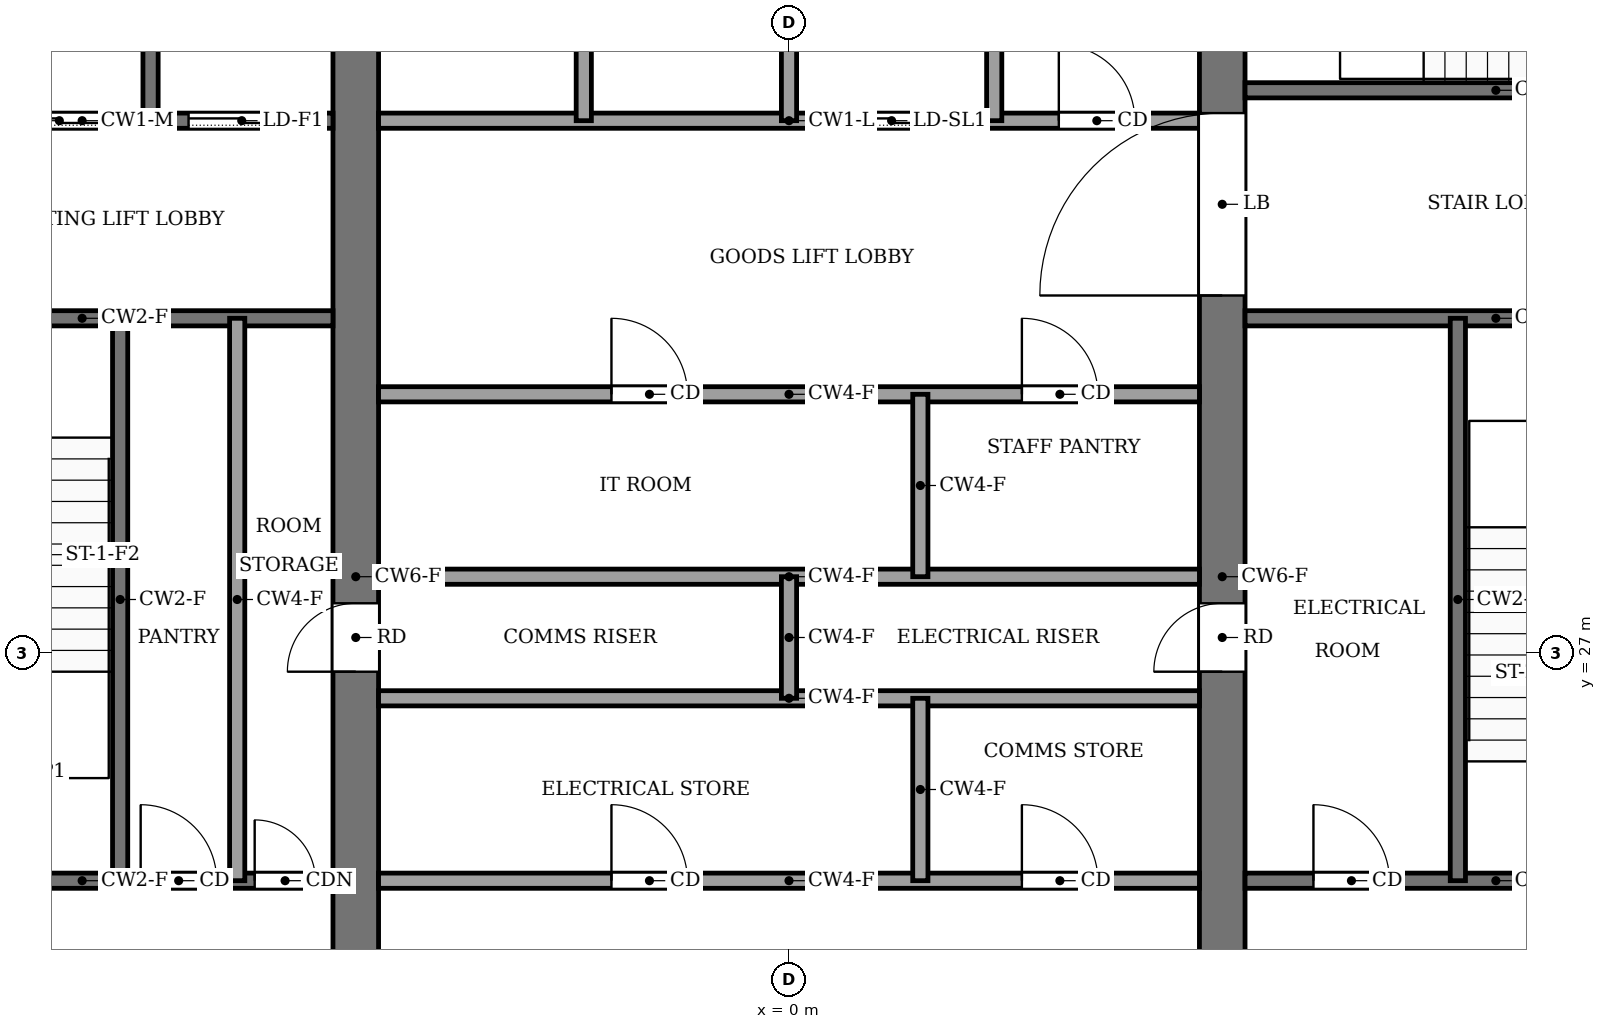
"""IFC4 building model, lengths in metres.
Left out: names, types, materials, properties, quantities, classifications, styles, units other than length and angle.
Written with IfcOpenShell. Run it as: python <this file> out.ifc"""

import sys

from ifc_helpers import new_model, si_unit, direction, frame, frame_2d, origin, place, context, subcontext, project, spatial, rectangle, extrude, element, fill, save


model = new_model("IFC4")
c1 = context("Model", 3, precision=1e-05, world=origin(), true_north=direction((0.0, 1.0)))
c2 = subcontext(c1, "Body", "Model", "MODEL_VIEW")
j1 = project(units=[si_unit("LENGTHUNIT", "METRE"), si_unit("PLANEANGLEUNIT", "RADIAN")], contexts=[c1])
p1 = place(None, origin())
s1 = spatial("IfcSite", under=j1, at=p1, CompositionType="ELEMENT")
p2 = place(p1, origin())
s2 = spatial("IfcBuilding", under=s1, at=p2, CompositionType="ELEMENT")
p3 = place(p2, frame((0.0, 0.0, 330.0)))
s3 = spatial("IfcBuildingStorey", under=s2, at=p3, CompositionType="ELEMENT", Elevation=330.0)
p4 = place(p3, frame((-5.7, 18.4, -0.13), z_axis=(0.0, 0.0, 1.0), x_axis=(0.0, 1.0, 0.0)))
e1 = element("IfcWall", 1, at=p4, inside=s3, PredefinedType="SHEAR", context=c2, shape_type="SweptSolid", body=[
    extrude(rectangle(XDim=19.2, YDim=0.6, at=frame_2d((9.6, 0.0))), origin(), (0.0, 0.0, 1.0), 3.95),
])
p5 = place(p4, frame((8.35, 0.0, 0.13)))
e2 = element("IfcOpeningElement", 2, at=p5, cuts=e1, PredefinedType="OPENING", context=c2, shape_type="SweptSolid", body=[
    extrude(rectangle(XDim=0.9, YDim=2.1, at=frame_2d((0.45, 1.05))), frame((0.0, 0.31, 0.0), z_axis=(0.0, -1.0, 0.0), x_axis=(1.0, 0.0, 0.0)), (0.0, 0.0, 1.0), 0.62),
])
p6 = place(p3, frame((5.7, 18.4, -0.13), z_axis=(0.0, 0.0, 1.0), x_axis=(0.0, 1.0, 0.0)))
e3 = element("IfcWall", 3, at=p6, inside=s3, PredefinedType="SHEAR", context=c2, shape_type="SweptSolid", body=[
    extrude(rectangle(XDim=19.2, YDim=0.6, at=frame_2d((9.6, 0.0))), origin(), (0.0, 0.0, 1.0), 3.95),
])
p7 = place(p6, frame((8.35, 0.0, 0.13)))
e4 = element("IfcOpeningElement", 4, at=p7, cuts=e3, PredefinedType="OPENING", context=c2, shape_type="SweptSolid", body=[
    extrude(rectangle(XDim=0.9, YDim=2.1, at=frame_2d((0.45, 1.05))), frame((0.0, 0.31, 0.0), z_axis=(0.0, -1.0, 0.0), x_axis=(1.0, 0.0, 0.0)), (0.0, 0.0, 1.0), 0.62),
])
p8 = place(p6, frame((13.3, 0.0, 0.13)))
e5 = element("IfcOpeningElement", 5, at=p8, cuts=e3, PredefinedType="OPENING", context=c2, shape_type="SweptSolid", body=[
    extrude(rectangle(XDim=2.4, YDim=2.4, at=frame_2d((1.2, 1.2))), frame((0.0, 0.31, 0.0), z_axis=(0.0, -1.0, 0.0), x_axis=(1.0, 0.0, 0.0)), (0.0, 0.0, 1.0), 0.62),
])
p9 = place(p3, frame((-12.6, 24.0, 0.0), z_axis=(0.0, 0.0, 1.0), x_axis=(1.0, 0.0, 0.0)))
e6 = element("IfcWall", 6, at=p9, inside=s3, PredefinedType="PARTITIONING", context=c2, shape_type="SweptSolid", body=[
    extrude(rectangle(XDim=6.6, YDim=0.2, at=frame_2d((3.3, 0.0))), origin(), (0.0, 0.0, 1.0), 3.82),
])
p10 = place(p9, frame((4.07, 0.0, 0.0)))
e7 = element("IfcOpeningElement", 7, at=p10, cuts=e6, PredefinedType="OPENING", context=c2, shape_type="SweptSolid", body=[
    extrude(rectangle(XDim=1.0, YDim=2.1, at=frame_2d((0.5, 1.05))), frame((0.0, 0.11, 0.0), z_axis=(0.0, -1.0, 0.0), x_axis=(1.0, 0.0, 0.0)), (0.0, 0.0, 1.0), 0.22),
])
p11 = place(p9, frame((5.57, 0.0, 0.0)))
e8 = element("IfcOpeningElement", 8, at=p11, cuts=e6, PredefinedType="OPENING", context=c2, shape_type="SweptSolid", body=[
    extrude(rectangle(XDim=0.8, YDim=2.1, at=frame_2d((0.4, 1.05))), frame((0.0, 0.11, 0.0), z_axis=(0.0, -1.0, 0.0), x_axis=(1.0, 0.0, 0.0)), (0.0, 0.0, 1.0), 0.22),
])
p12 = place(p3, frame((-5.4, 24.0, 0.0), z_axis=(0.0, 0.0, 1.0), x_axis=(1.0, 0.0, 0.0)))
e9 = element("IfcWall", 9, at=p12, inside=s3, PredefinedType="PARTITIONING", context=c2, shape_type="SweptSolid", body=[
    extrude(rectangle(XDim=10.8, YDim=0.2, at=frame_2d((5.4, 0.0))), origin(), (0.0, 0.0, 1.0), 3.82),
])
p13 = place(p12, frame((3.064, 0.0, 0.0)))
e10 = element("IfcOpeningElement", 10, at=p13, cuts=e9, PredefinedType="OPENING", context=c2, shape_type="SweptSolid", body=[
    extrude(rectangle(XDim=1.0, YDim=2.1, at=frame_2d((0.5, 1.05))), frame((0.0, 0.11, 0.0), z_axis=(0.0, -1.0, 0.0), x_axis=(1.0, 0.0, 0.0)), (0.0, 0.0, 1.0), 0.22),
])
p14 = place(p12, frame((8.464, 0.0, 0.0)))
e11 = element("IfcOpeningElement", 11, at=p14, cuts=e9, PredefinedType="OPENING", context=c2, shape_type="SweptSolid", body=[
    extrude(rectangle(XDim=1.0, YDim=2.1, at=frame_2d((0.5, 1.05))), frame((0.0, 0.11, 0.0), z_axis=(0.0, -1.0, 0.0), x_axis=(1.0, 0.0, 0.0)), (0.0, 0.0, 1.0), 0.22),
])
p15 = place(p3, frame((6.0, 24.0, 0.0), z_axis=(0.0, 0.0, 1.0), x_axis=(1.0, 0.0, 0.0)))
e12 = element("IfcWall", 12, at=p15, inside=s3, PredefinedType="PARTITIONING", context=c2, shape_type="SweptSolid", body=[
    extrude(rectangle(XDim=6.6, YDim=0.2, at=frame_2d((3.3, 0.0))), origin(), (0.0, 0.0, 1.0), 3.82),
])
p16 = place(p15, frame((0.9, 0.0, 0.0)))
e13 = element("IfcOpeningElement", 13, at=p16, cuts=e12, PredefinedType="OPENING", context=c2, shape_type="SweptSolid", body=[
    extrude(rectangle(XDim=1.0, YDim=2.1, at=frame_2d((0.5, 1.05))), frame((0.0, 0.11, 0.0), z_axis=(0.0, -1.0, 0.0), x_axis=(1.0, 0.0, 0.0)), (0.0, 0.0, 1.0), 0.22),
])
p17 = place(p15, frame((4.4, 0.0, 0.0)))
e14 = element("IfcOpeningElement", 14, at=p17, cuts=e12, PredefinedType="OPENING", context=c2, shape_type="SweptSolid", body=[
    extrude(rectangle(XDim=1.2, YDim=2.2, at=frame_2d((0.6, 1.1))), frame((0.0, 0.11, 0.0), z_axis=(0.0, -1.0, 0.0), x_axis=(1.0, 0.0, 0.0)), (0.0, 0.0, 1.0), 0.22),
])
for number, where, z_axis, x_axis in (
    (15, (-5.4, 26.4, 0.0), (0.0, 0.0, 1.0), (1.0, 0.0, 0.0)),
    (16, (-5.4, 28.0, 0.0), (0.0, 0.0, 1.0), (1.0, 0.0, 0.0)),
):
    element("IfcWall", number, at=place(p3, frame(where, z_axis=z_axis, x_axis=x_axis)), inside=s3, PredefinedType="PARTITIONING", context=c2, shape_type="SweptSolid", body=[
        extrude(rectangle(XDim=10.8, YDim=0.2, at=frame_2d((5.4, 0.0))), origin(), (0.0, 0.0, 1.0), 3.82),
    ])
p18 = place(p3, frame((-5.4, 30.4, 0.0), z_axis=(0.0, 0.0, 1.0), x_axis=(1.0, 0.0, 0.0)))
e17 = element("IfcWall", 17, at=p18, inside=s3, PredefinedType="PARTITIONING", context=c2, shape_type="SweptSolid", body=[
    extrude(rectangle(XDim=10.8, YDim=0.2, at=frame_2d((5.4, 0.0))), origin(), (0.0, 0.0, 1.0), 3.82),
])
p19 = place(p18, frame((3.064, 0.0, 0.0)))
e18 = element("IfcOpeningElement", 18, at=p19, cuts=e17, PredefinedType="OPENING", context=c2, shape_type="SweptSolid", body=[
    extrude(rectangle(XDim=1.0, YDim=2.1, at=frame_2d((0.5, 1.05))), frame((0.0, 0.11, 0.0), z_axis=(0.0, -1.0, 0.0), x_axis=(1.0, 0.0, 0.0)), (0.0, 0.0, 1.0), 0.22),
])
p20 = place(p18, frame((8.464, 0.0, 0.0)))
e19 = element("IfcOpeningElement", 19, at=p20, cuts=e17, PredefinedType="OPENING", context=c2, shape_type="SweptSolid", body=[
    extrude(rectangle(XDim=1.0, YDim=2.1, at=frame_2d((0.5, 1.05))), frame((0.0, 0.11, 0.0), z_axis=(0.0, -1.0, 0.0), x_axis=(1.0, 0.0, 0.0)), (0.0, 0.0, 1.0), 0.22),
])
p21 = place(p3, frame((-12.6, 31.4, 0.0), z_axis=(0.0, 0.0, 1.0), x_axis=(1.0, 0.0, 0.0)))
e20 = element("IfcWall", 20, at=p21, inside=s3, PredefinedType="PARTITIONING", context=c2, shape_type="SweptSolid", body=[
    extrude(rectangle(XDim=6.6, YDim=0.2, at=frame_2d((3.3, 0.0))), origin(), (0.0, 0.0, 1.0), 3.82),
])
p22 = place(p21, frame((1.0, 0.0, 0.0)))
e21 = element("IfcOpeningElement", 21, at=p22, cuts=e20, PredefinedType="OPENING", context=c2, shape_type="SweptSolid", body=[
    extrude(rectangle(XDim=1.2, YDim=2.2, at=frame_2d((0.6, 1.1))), frame((0.0, 0.11, 0.0), z_axis=(0.0, -1.0, 0.0), x_axis=(1.0, 0.0, 0.0)), (0.0, 0.0, 1.0), 0.22),
])
p23 = place(p3, frame((6.0, 31.4, 0.0), z_axis=(0.0, 0.0, 1.0), x_axis=(1.0, 0.0, 0.0)))
e22 = element("IfcWall", 22, at=p23, inside=s3, PredefinedType="PARTITIONING", context=c2, shape_type="SweptSolid", body=[
    extrude(rectangle(XDim=6.6, YDim=0.2, at=frame_2d((3.3, 0.0))), origin(), (0.0, 0.0, 1.0), 3.82),
])
p24 = place(p3, frame((-12.6, 34.0, 0.0), z_axis=(0.0, 0.0, 1.0), x_axis=(1.0, 0.0, 0.0)))
e23 = element("IfcWall", 23, at=p24, inside=s3, PredefinedType="PARTITIONING", context=c2, shape_type="SweptSolid", body=[
    extrude(rectangle(XDim=6.6, YDim=0.2, at=frame_2d((3.3, 0.0))), origin(), (0.0, 0.0, 1.0), 3.82),
])
p25 = place(p24, frame((4.7, 0.0, 0.0)))
e24 = element("IfcOpeningElement", 24, at=p25, cuts=e23, PredefinedType="OPENING", context=c2, shape_type="SweptSolid", body=[
    extrude(rectangle(XDim=1.4, YDim=2.2, at=frame_2d((0.7, 1.1))), frame((0.0, 0.11, 0.0), z_axis=(0.0, -1.0, 0.0), x_axis=(1.0, 0.0, 0.0)), (0.0, 0.0, 1.0), 0.22),
])
p26 = place(p24, frame((2.3, 0.0, 0.0)))
e25 = element("IfcOpeningElement", 25, at=p26, cuts=e23, PredefinedType="OPENING", context=c2, shape_type="SweptSolid", body=[
    extrude(rectangle(XDim=1.4, YDim=2.2, at=frame_2d((0.7, 1.1))), frame((0.0, 0.11, 0.0), z_axis=(0.0, -1.0, 0.0), x_axis=(1.0, 0.0, 0.0)), (0.0, 0.0, 1.0), 0.22),
])
p27 = place(p24, frame((0.45, 0.0, 0.0)))
e26 = element("IfcOpeningElement", 26, at=p27, cuts=e23, PredefinedType="OPENING", context=c2, shape_type="SweptSolid", body=[
    extrude(rectangle(XDim=0.9, YDim=2.1, at=frame_2d((0.45, 1.05))), frame((0.0, 0.11, 0.0), z_axis=(0.0, -1.0, 0.0), x_axis=(1.0, 0.0, 0.0)), (0.0, 0.0, 1.0), 0.22),
])
p28 = place(p3, frame((-5.4, 34.0, 0.0), z_axis=(0.0, 0.0, 1.0), x_axis=(1.0, 0.0, 0.0)))
e27 = element("IfcWall", 27, at=p28, inside=s3, PredefinedType="PARTITIONING", context=c2, shape_type="SweptSolid", body=[
    extrude(rectangle(XDim=10.8, YDim=0.2, at=frame_2d((5.4, 0.0))), origin(), (0.0, 0.0, 1.0), 3.82),
])
p29 = place(p28, frame((6.15, 0.0, 0.0)))
e28 = element("IfcOpeningElement", 28, at=p29, cuts=e27, PredefinedType="OPENING", context=c2, shape_type="SweptSolid", body=[
    extrude(rectangle(XDim=1.2, YDim=2.2, at=frame_2d((0.6, 1.1))), frame((0.0, 0.11, 0.0), z_axis=(0.0, -1.0, 0.0), x_axis=(1.0, 0.0, 0.0)), (0.0, 0.0, 1.0), 0.22),
])
p30 = place(p28, frame((8.95, 0.0, 0.0)))
e29 = element("IfcOpeningElement", 29, at=p30, cuts=e27, PredefinedType="OPENING", context=c2, shape_type="SweptSolid", body=[
    extrude(rectangle(XDim=1.0, YDim=2.1, at=frame_2d((0.5, 1.05))), frame((0.0, 0.11, 0.0), z_axis=(0.0, -1.0, 0.0), x_axis=(1.0, 0.0, 0.0)), (0.0, 0.0, 1.0), 0.22),
])
p31 = place(p3, frame((6.0, 34.4, 0.0), z_axis=(0.0, 0.0, 1.0), x_axis=(1.0, 0.0, 0.0)))
e30 = element("IfcWall", 30, at=p31, inside=s3, PredefinedType="PARTITIONING", context=c2, shape_type="SweptSolid", body=[
    extrude(rectangle(XDim=6.6, YDim=0.2, at=frame_2d((3.3, 0.0))), origin(), (0.0, 0.0, 1.0), 3.82),
])
p32 = place(p31, frame((4.8, 0.0, 0.0)))
e31 = element("IfcOpeningElement", 31, at=p32, cuts=e30, PredefinedType="OPENING", context=c2, shape_type="SweptSolid", body=[
    extrude(rectangle(XDim=1.2, YDim=2.2, at=frame_2d((0.6, 1.1))), frame((0.0, 0.11, 0.0), z_axis=(0.0, -1.0, 0.0), x_axis=(1.0, 0.0, 0.0)), (0.0, 0.0, 1.0), 0.22),
])
p33 = place(p3, frame((-8.8, 24.0, 0.0), z_axis=(0.0, 0.0, 1.0), x_axis=(0.0, 1.0, 0.0)))
e32 = element("IfcWall", 32, at=p33, inside=s3, PredefinedType="PARTITIONING", context=c2, shape_type="SweptSolid", body=[
    extrude(rectangle(XDim=7.4, YDim=0.2, at=frame_2d((3.7, 0.0))), origin(), (0.0, 0.0, 1.0), 3.82),
])
p34 = place(p3, frame((-8.4, 34.0, 0.0), z_axis=(0.0, 0.0, 1.0), x_axis=(0.0, 1.0, 0.0)))
e33 = element("IfcWall", 33, at=p34, inside=s3, PredefinedType="PARTITIONING", context=c2, shape_type="SweptSolid", body=[
    extrude(rectangle(XDim=3.6, YDim=0.2, at=frame_2d((1.8, 0.0))), origin(), (0.0, 0.0, 1.0), 3.82),
])
p35 = place(p3, frame((-7.26, 24.0, 0.0), z_axis=(0.0, 0.0, 1.0), x_axis=(0.0, 1.0, 0.0)))
e34 = element("IfcWall", 34, at=p35, inside=s3, PredefinedType="PARTITIONING", context=c2, shape_type="SweptSolid", body=[
    extrude(rectangle(XDim=7.4, YDim=0.2, at=frame_2d((3.7, 0.0))), origin(), (0.0, 0.0, 1.0), 3.82),
])
p36 = place(p3, frame((-2.7, 34.0, 0.0), z_axis=(0.0, 0.0, 1.0), x_axis=(0.0, 1.0, 0.0)))
e35 = element("IfcWall", 35, at=p36, inside=s3, PredefinedType="PARTITIONING", context=c2, shape_type="SweptSolid", body=[
    extrude(rectangle(XDim=3.6, YDim=0.2, at=frame_2d((1.8, 0.0))), origin(), (0.0, 0.0, 1.0), 3.82),
])
p37 = place(p3, frame((0.0, 26.4, 0.0), z_axis=(0.0, 0.0, 1.0), x_axis=(0.0, 1.0, 0.0)))
e36 = element("IfcWall", 36, at=p37, inside=s3, PredefinedType="PARTITIONING", context=c2, shape_type="SweptSolid", body=[
    extrude(rectangle(XDim=1.6, YDim=0.2, at=frame_2d((0.8, 0.0))), origin(), (0.0, 0.0, 1.0), 3.82),
])
p38 = place(p3, frame((0.0, 34.0, 0.0), z_axis=(0.0, 0.0, 1.0), x_axis=(0.0, 1.0, 0.0)))
e37 = element("IfcWall", 37, at=p38, inside=s3, PredefinedType="PARTITIONING", context=c2, shape_type="SweptSolid", body=[
    extrude(rectangle(XDim=3.6, YDim=0.2, at=frame_2d((1.8, 0.0))), origin(), (0.0, 0.0, 1.0), 3.82),
])
for number, where, z_axis, x_axis in (
    (38, (1.728, 24.0, 0.0), (0.0, 0.0, 1.0), (0.0, 1.0, 0.0)),
    (39, (1.728, 28.0, 0.0), (0.0, 0.0, 1.0), (0.0, 1.0, 0.0)),
):
    element("IfcWall", number, at=place(p3, frame(where, z_axis=z_axis, x_axis=x_axis)), inside=s3, PredefinedType="PARTITIONING", context=c2, shape_type="SweptSolid", body=[
        extrude(rectangle(XDim=2.4, YDim=0.2, at=frame_2d((1.2, 0.0))), origin(), (0.0, 0.0, 1.0), 3.82),
    ])
p39 = place(p3, frame((2.7, 34.0, 0.0), z_axis=(0.0, 0.0, 1.0), x_axis=(0.0, 1.0, 0.0)))
e40 = element("IfcWall", 40, at=p39, inside=s3, PredefinedType="PARTITIONING", context=c2, shape_type="SweptSolid", body=[
    extrude(rectangle(XDim=3.6, YDim=0.2, at=frame_2d((1.8, 0.0))), origin(), (0.0, 0.0, 1.0), 3.82),
])
p40 = place(p3, frame((8.8, 24.0, 0.0), z_axis=(0.0, 0.0, 1.0), x_axis=(0.0, 1.0, 0.0)))
e41 = element("IfcWall", 41, at=p40, inside=s3, PredefinedType="PARTITIONING", context=c2, shape_type="SweptSolid", body=[
    extrude(rectangle(XDim=7.4, YDim=0.2, at=frame_2d((3.7, 0.0))), origin(), (0.0, 0.0, 1.0), 3.82),
])
p41 = place(p29, origin())
e42 = element("IfcDoor", 42, at=p41, inside=s3, OperationType="SLIDING_TO_LEFT", PredefinedType="DOOR", context=c2, shape_type="SweptSolid", body=[
    extrude(rectangle(XDim=1.2, YDim=2.2, at=frame_2d((0.6, 1.1))), frame((0.0, 0.025, 0.0), z_axis=(0.0, -1.0, 0.0), x_axis=(1.0, 0.0, 0.0)), (0.0, 0.0, 1.0), 0.05),
])
fill(e28, e42)
p42 = place(p25, origin())
e43 = element("IfcDoor", 43, at=p42, inside=s3, OperationType="SLIDING_TO_LEFT", PredefinedType="DOOR", context=c2, shape_type="SweptSolid", body=[
    extrude(rectangle(XDim=1.4, YDim=2.2, at=frame_2d((0.7, 1.1))), frame((0.0, 0.025, 0.0), z_axis=(0.0, -1.0, 0.0), x_axis=(1.0, 0.0, 0.0)), (0.0, 0.0, 1.0), 0.05),
])
fill(e24, e43)
p43 = place(p26, origin())
e44 = element("IfcDoor", 44, at=p43, inside=s3, OperationType="SLIDING_TO_LEFT", PredefinedType="DOOR", context=c2, shape_type="SweptSolid", body=[
    extrude(rectangle(XDim=1.4, YDim=2.2, at=frame_2d((0.7, 1.1))), frame((0.0, 0.025, 0.0), z_axis=(0.0, -1.0, 0.0), x_axis=(1.0, 0.0, 0.0)), (0.0, 0.0, 1.0), 0.05),
])
fill(e25, e44)
p44 = place(p13, origin())
e45 = element("IfcDoor", 45, at=p44, inside=s3, OperationType="SINGLE_SWING_RIGHT", PredefinedType="DOOR", context=c2, shape_type="SweptSolid", body=[
    extrude(rectangle(XDim=1.0, YDim=2.1, at=frame_2d((0.5, 1.05))), frame((0.0, 0.025, 0.0), z_axis=(0.0, -1.0, 0.0), x_axis=(1.0, 0.0, 0.0)), (0.0, 0.0, 1.0), 0.05),
])
fill(e10, e45)
p45 = place(p14, origin())
e46 = element("IfcDoor", 46, at=p45, inside=s3, OperationType="SINGLE_SWING_LEFT", PredefinedType="DOOR", context=c2, shape_type="SweptSolid", body=[
    extrude(rectangle(XDim=1.0, YDim=2.1, at=frame_2d((0.5, 1.05))), frame((0.0, 0.025, 0.0), z_axis=(0.0, -1.0, 0.0), x_axis=(1.0, 0.0, 0.0)), (0.0, 0.0, 1.0), 0.05),
])
fill(e11, e46)
p46 = place(p19, origin())
e47 = element("IfcDoor", 47, at=p46, inside=s3, OperationType="SINGLE_SWING_RIGHT", PredefinedType="DOOR", context=c2, shape_type="SweptSolid", body=[
    extrude(rectangle(XDim=1.0, YDim=2.1, at=frame_2d((0.5, 1.05))), frame((0.0, 0.025, 0.0), z_axis=(0.0, -1.0, 0.0), x_axis=(1.0, 0.0, 0.0)), (0.0, 0.0, 1.0), 0.05),
])
fill(e18, e47)
p47 = place(p20, origin())
e48 = element("IfcDoor", 48, at=p47, inside=s3, OperationType="SINGLE_SWING_LEFT", PredefinedType="DOOR", context=c2, shape_type="SweptSolid", body=[
    extrude(rectangle(XDim=1.0, YDim=2.1, at=frame_2d((0.5, 1.05))), frame((0.0, 0.025, 0.0), z_axis=(0.0, -1.0, 0.0), x_axis=(1.0, 0.0, 0.0)), (0.0, 0.0, 1.0), 0.05),
])
fill(e19, e48)
p48 = place(p10, origin())
e49 = element("IfcDoor", 49, at=p48, inside=s3, OperationType="SINGLE_SWING_RIGHT", PredefinedType="DOOR", context=c2, shape_type="SweptSolid", body=[
    extrude(rectangle(XDim=1.0, YDim=2.1, at=frame_2d((0.5, 1.05))), frame((0.0, 0.025, 0.0), z_axis=(0.0, -1.0, 0.0), x_axis=(1.0, 0.0, 0.0)), (0.0, 0.0, 1.0), 0.05),
])
fill(e7, e49)
p49 = place(p11, origin())
e50 = element("IfcDoor", 50, at=p49, inside=s3, OperationType="SINGLE_SWING_LEFT", PredefinedType="DOOR", context=c2, shape_type="SweptSolid", body=[
    extrude(rectangle(XDim=0.8, YDim=2.1, at=frame_2d((0.4, 1.05))), frame((0.0, 0.025, 0.0), z_axis=(0.0, -1.0, 0.0), x_axis=(1.0, 0.0, 0.0)), (0.0, 0.0, 1.0), 0.05),
])
fill(e8, e50)
p50 = place(p16, origin())
e51 = element("IfcDoor", 51, at=p50, inside=s3, OperationType="SINGLE_SWING_RIGHT", PredefinedType="DOOR", context=c2, shape_type="SweptSolid", body=[
    extrude(rectangle(XDim=1.0, YDim=2.1, at=frame_2d((0.5, 1.05))), frame((0.0, 0.025, 0.0), z_axis=(0.0, -1.0, 0.0), x_axis=(1.0, 0.0, 0.0)), (0.0, 0.0, 1.0), 0.05),
])
fill(e13, e51)
p51 = place(p30, origin())
e52 = element("IfcDoor", 52, at=p51, inside=s3, OperationType="SINGLE_SWING_LEFT", PredefinedType="DOOR", context=c2, shape_type="SweptSolid", body=[
    extrude(rectangle(XDim=1.0, YDim=2.1, at=frame_2d((0.5, 1.05))), frame((0.0, 0.025, 0.0), z_axis=(0.0, -1.0, 0.0), x_axis=(1.0, 0.0, 0.0)), (0.0, 0.0, 1.0), 0.05),
])
fill(e29, e52)
p52 = place(p5, origin())
e53 = element("IfcDoor", 53, at=p52, inside=s3, OperationType="SINGLE_SWING_LEFT", PredefinedType="DOOR", context=c2, shape_type="SweptSolid", body=[
    extrude(rectangle(XDim=0.9, YDim=2.1, at=frame_2d((0.45, 1.05))), frame((0.0, 0.025, 0.0), z_axis=(0.0, -1.0, 0.0), x_axis=(1.0, 0.0, 0.0)), (0.0, 0.0, 1.0), 0.05),
])
fill(e2, e53)
p53 = place(p7, origin())
e54 = element("IfcDoor", 54, at=p53, inside=s3, OperationType="SINGLE_SWING_RIGHT", PredefinedType="DOOR", context=c2, shape_type="SweptSolid", body=[
    extrude(rectangle(XDim=0.9, YDim=2.1, at=frame_2d((0.45, 1.05))), frame((0.0, 0.025, 0.0), z_axis=(0.0, -1.0, 0.0), x_axis=(1.0, 0.0, 0.0)), (0.0, 0.0, 1.0), 0.05),
])
fill(e4, e54)
p54 = place(p8, origin())
e55 = element("IfcDoor", 55, at=p54, inside=s3, OperationType="DOUBLE_DOOR_SINGLE_SWING", PredefinedType="DOOR", context=c2, shape_type="SweptSolid", body=[
    extrude(rectangle(XDim=2.4, YDim=2.4, at=frame_2d((1.2, 1.2))), frame((0.0, 0.025, 0.0), z_axis=(0.0, -1.0, 0.0), x_axis=(1.0, 0.0, 0.0)), (0.0, 0.0, 1.0), 0.05),
])
fill(e5, e55)
save(model, sys.argv[1])
